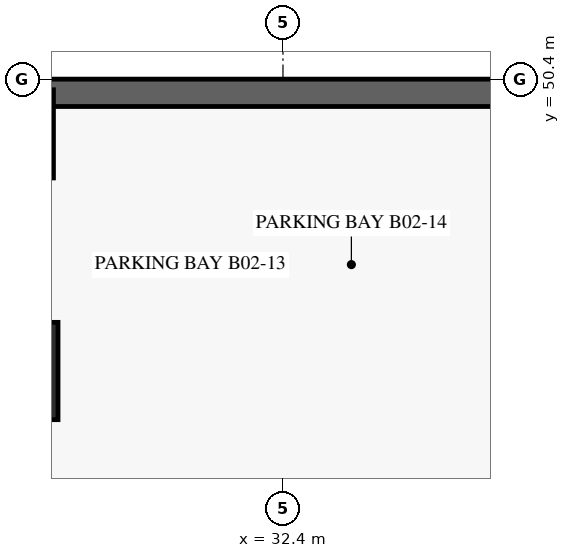
"""IFC4 building model, lengths in metres.
Left out: names, types, materials, properties, quantities, classifications, styles, units other than length and angle.
Written with IfcOpenShell. Run it as: python <this file> out.ifc"""

import sys

from ifc_helpers import new_model, si_unit, direction, frame, frame_2d, origin, origin_2d, place, context, subcontext, project, spatial, rectangle, extrude, source, transform, mapped, element, save


model = new_model("IFC4")
c1 = context("Model", 3, precision=1e-05, world=origin(), true_north=direction((0.0, 1.0)))
c2 = subcontext(c1, "Body", "Model", "MODEL_VIEW")
j1 = project(units=[si_unit("LENGTHUNIT", "METRE"), si_unit("PLANEANGLEUNIT", "RADIAN")], contexts=[c1])
p1 = place(None, origin())
s1 = spatial("IfcSite", under=j1, at=p1, CompositionType="ELEMENT")
p2 = place(p1, origin())
s2 = spatial("IfcBuilding", under=s1, at=p2, CompositionType="ELEMENT")
p3 = place(p2, frame((0.0, 0.0, -7.2)))
s3 = spatial("IfcBuildingStorey", under=s2, at=p3, CompositionType="ELEMENT", Elevation=-7.2)
p4 = place(p3, frame((64.575, 50.175, -0.36), z_axis=(0.0, 0.0, 1.0), x_axis=(-1.0, 0.0, 0.0)))
e1 = element("IfcWall", 1, at=p4, inside=s3, PredefinedType="USERDEFINED", context=c2, shape_type="SweptSolid", body=[
    extrude(rectangle(XDim=64.35, YDim=0.45, at=frame_2d((32.175, 0.0))), origin(), (0.0, 0.0, 1.0), 3.598),
])
m1 = source(origin(), c2, "Body", "SweptSolid", [
    extrude(rectangle(XDim=1.6, YDim=1.6, at=origin_2d()), origin(), (0.0, 0.0, 1.0), 3.6),
])
p5 = place(p3, frame((27.9, 45.6, -0.36), z_axis=(0.0, 0.0, 1.0), x_axis=(1.0, 0.0, 0.0)))
e2 = element("IfcColumn", 2, at=p5, inside=s3, PredefinedType="COLUMN", context=c2, shape_type="MappedRepresentation", body=[
    mapped(m1, transform((0.0, 0.0, 0.0), scale=1.0)),
])
m2 = source(origin(), c2, "Body", "SweptSolid", [
    extrude(rectangle(XDim=1.45, YDim=1.45, at=origin_2d()), origin(), (0.0, 0.0, 1.0), 3.6),
])
p6 = place(p3, frame((27.9, 49.5, -0.36), z_axis=(0.0, 0.0, 1.0), x_axis=(1.0, 0.0, 0.0)))
e3 = element("IfcColumn", 3, at=p6, inside=s3, PredefinedType="COLUMN", context=c2, shape_type="MappedRepresentation", body=[
    mapped(m2, transform((0.0, 0.0, 0.0), scale=1.0)),
])
save(model, sys.argv[1])
